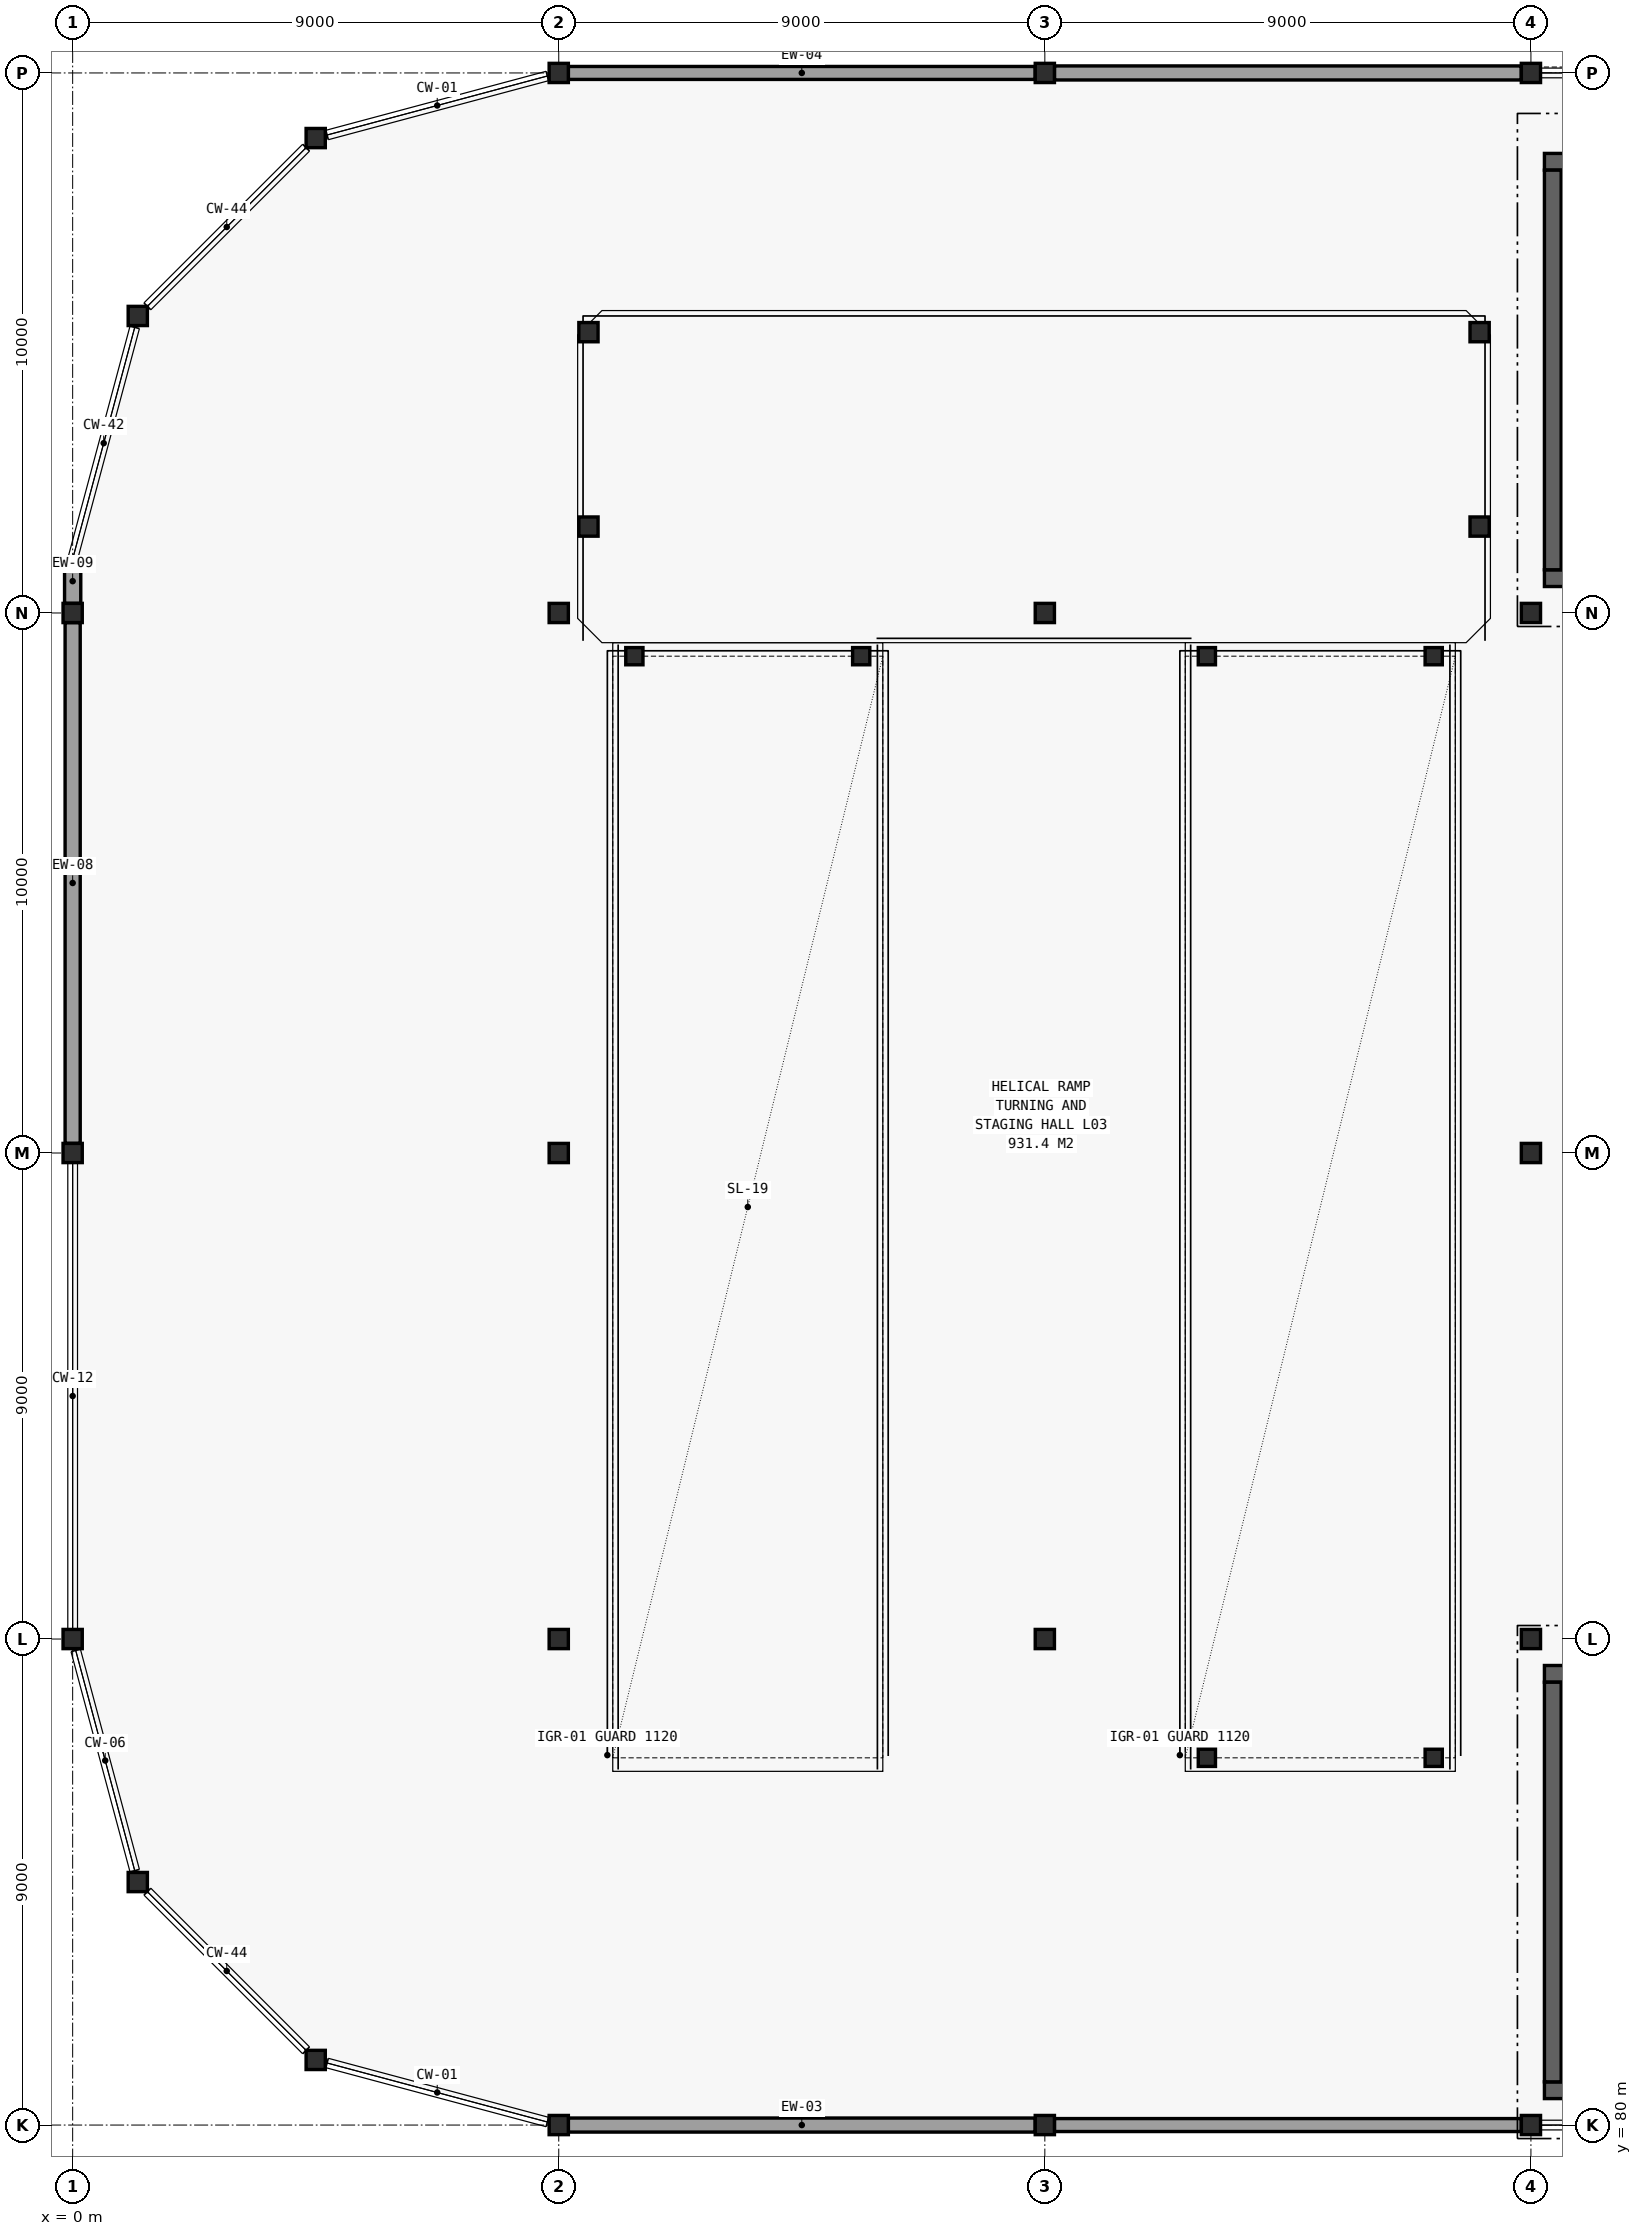
"""IFC4 building model, lengths in metres.
Left out: names, types, materials, properties, quantities, classifications, styles, units other than length and angle.
Written with IfcOpenShell. Run it as: python <this file> out.ifc"""

import sys

from ifc_helpers import new_model, si_unit, direction, frame, frame_2d, origin, origin_2d, place, context, subcontext, project, spatial, rectangle, hollow_circle, extrude, element, save


model = new_model("IFC4")
c1 = context("Model", 3, precision=1e-05, world=origin(), true_north=direction((0.0, 1.0)))
c2 = subcontext(c1, "Body", "Model", "MODEL_VIEW")
j1 = project(units=[si_unit("LENGTHUNIT", "METRE"), si_unit("PLANEANGLEUNIT", "RADIAN")], contexts=[c1])
p1 = place(None, origin())
s1 = spatial("IfcSite", under=j1, at=p1, CompositionType="ELEMENT")
p2 = place(p1, origin())
s2 = spatial("IfcBuilding", under=s1, at=p2, CompositionType="ELEMENT")
p3 = place(p2, frame((0.0, 0.0, 13.5)))
s3 = spatial("IfcBuildingStorey", under=s2, at=p3, CompositionType="ELEMENT", Elevation=13.5)
for number, where, z_axis, x_axis in (
    (1, (0.0, 89.0, 0.0), (0.0, 0.0, 1.0), (1.0, 0.0, 0.0)),
    (2, (0.0, 98.0, 0.0), (0.0, 0.0, 1.0), (1.0, 0.0, 0.0)),
    (3, (0.0, 108.0, 0.0), (0.0, 0.0, 1.0), (1.0, 0.0, 0.0)),
    (4, (1.206, 84.5, 0.0), (0.0, 0.0, 1.0), (1.0, 0.0, 0.0)),
    (5, (1.206, 113.5, 0.0), (0.0, 0.0, 1.0), (1.0, 0.0, 0.0)),
    (6, (4.5, 81.206, 0.0), (0.0, 0.0, 1.0), (1.0, 0.0, 0.0)),
    (7, (4.5, 116.794, 0.0), (0.0, 0.0, 1.0), (1.0, 0.0, 0.0)),
    (8, (9.0, 80.0, 0.0), (0.0, 0.0, 1.0), (1.0, 0.0, 0.0)),
    (9, (9.0, 89.0, 0.0), (0.0, 0.0, 1.0), (1.0, 0.0, 0.0)),
    (10, (9.0, 98.0, 0.0), (0.0, 0.0, 1.0), (1.0, 0.0, 0.0)),
    (11, (9.0, 108.0, 0.0), (0.0, 0.0, 1.0), (1.0, 0.0, 0.0)),
    (12, (9.0, 118.0, 0.0), (0.0, 0.0, 1.0), (1.0, 0.0, 0.0)),
    (13, (9.55, 109.6, 0.0), (0.0, 0.0, 1.0), (1.0, 0.0, 0.0)),
    (14, (9.55, 113.2, 0.0), (0.0, 0.0, 1.0), (1.0, 0.0, 0.0)),
):
    element("IfcColumn", number, at=place(p3, frame(where, z_axis=z_axis, x_axis=x_axis)), inside=s3, PredefinedType="COLUMN", context=c2, shape_type="SweptSolid", body=[
        extrude(hollow_circle(Radius=0.178, WallThickness=0.013, at=origin_2d()), origin(), (0.0, 0.0, 1.0), 4.2),
    ])
for number, where, z_axis, x_axis in (
    (15, (10.4, 107.2, 0.0), (0.0, 0.0, 1.0), (1.0, 0.0, 0.0)),
    (16, (14.6, 107.2, 0.0), (0.0, 0.0, 1.0), (1.0, 0.0, 0.0)),
):
    element("IfcColumn", number, at=place(p3, frame(where, z_axis=z_axis, x_axis=x_axis)), inside=s3, PredefinedType="COLUMN", context=c2, shape_type="SweptSolid", body=[
        extrude(hollow_circle(Radius=0.159, WallThickness=0.01, at=origin_2d()), origin(), (0.0, 0.0, 1.0), 1.7),
    ])
for number, where, z_axis, x_axis in (
    (17, (18.0, 80.0, 0.0), (0.0, 0.0, 1.0), (1.0, 0.0, 0.0)),
    (18, (18.0, 89.0, 0.0), (0.0, 0.0, 1.0), (1.0, 0.0, 0.0)),
    (19, (18.0, 108.0, 0.0), (0.0, 0.0, 1.0), (1.0, 0.0, 0.0)),
    (20, (18.0, 118.0, 0.0), (0.0, 0.0, 1.0), (1.0, 0.0, 0.0)),
):
    element("IfcColumn", number, at=place(p3, frame(where, z_axis=z_axis, x_axis=x_axis)), inside=s3, PredefinedType="COLUMN", context=c2, shape_type="SweptSolid", body=[
        extrude(hollow_circle(Radius=0.178, WallThickness=0.013, at=origin_2d()), origin(), (0.0, 0.0, 1.0), 4.2),
    ])
p4 = place(p3, frame((21.0, 86.8, 0.0), z_axis=(0.0, 0.0, 1.0), x_axis=(1.0, 0.0, 0.0)))
e21 = element("IfcColumn", 21, at=p4, inside=s3, PredefinedType="COLUMN", context=c2, shape_type="SweptSolid", body=[
    extrude(hollow_circle(Radius=0.159, WallThickness=0.01, at=origin_2d()), origin(), (0.0, 0.0, 1.0), 3.8),
])
p5 = place(p3, frame((21.0, 107.2, 0.0), z_axis=(0.0, 0.0, 1.0), x_axis=(1.0, 0.0, 0.0)))
e22 = element("IfcColumn", 22, at=p5, inside=s3, PredefinedType="COLUMN", context=c2, shape_type="SweptSolid", body=[
    extrude(hollow_circle(Radius=0.159, WallThickness=0.01, at=origin_2d()), origin(), (0.0, 0.0, 1.0), 1.7),
])
p6 = place(p3, frame((25.2, 86.8, 0.0), z_axis=(0.0, 0.0, 1.0), x_axis=(1.0, 0.0, 0.0)))
e23 = element("IfcColumn", 23, at=p6, inside=s3, PredefinedType="COLUMN", context=c2, shape_type="SweptSolid", body=[
    extrude(hollow_circle(Radius=0.159, WallThickness=0.01, at=origin_2d()), origin(), (0.0, 0.0, 1.0), 3.8),
])
p7 = place(p3, frame((25.2, 107.2, 0.0), z_axis=(0.0, 0.0, 1.0), x_axis=(1.0, 0.0, 0.0)))
e24 = element("IfcColumn", 24, at=p7, inside=s3, PredefinedType="COLUMN", context=c2, shape_type="SweptSolid", body=[
    extrude(hollow_circle(Radius=0.159, WallThickness=0.01, at=origin_2d()), origin(), (0.0, 0.0, 1.0), 1.7),
])
for number, where, z_axis, x_axis in (
    (25, (26.05, 109.6, 0.0), (0.0, 0.0, 1.0), (1.0, 0.0, 0.0)),
    (26, (26.05, 113.2, 0.0), (0.0, 0.0, 1.0), (1.0, 0.0, 0.0)),
    (27, (27.0, 80.0, 0.0), (0.0, 0.0, 1.0), (1.0, 0.0, 0.0)),
    (28, (27.0, 89.0, 0.0), (0.0, 0.0, 1.0), (1.0, 0.0, 0.0)),
    (29, (27.0, 98.0, 0.0), (0.0, 0.0, 1.0), (1.0, 0.0, 0.0)),
    (30, (27.0, 108.0, 0.0), (0.0, 0.0, 1.0), (1.0, 0.0, 0.0)),
    (31, (27.0, 118.0, 0.0), (0.0, 0.0, 1.0), (1.0, 0.0, 0.0)),
):
    element("IfcColumn", number, at=place(p3, frame(where, z_axis=z_axis, x_axis=x_axis)), inside=s3, PredefinedType="COLUMN", context=c2, shape_type="SweptSolid", body=[
        extrude(hollow_circle(Radius=0.178, WallThickness=0.013, at=origin_2d()), origin(), (0.0, 0.0, 1.0), 4.2),
    ])
p8 = place(p3, frame((9.178, 80.0, 0.0), z_axis=(0.0, 0.0, 1.0), x_axis=(1.0, 0.0, 0.0)))
e32 = element("IfcWall", 32, at=p8, inside=s3, PredefinedType="SOLIDWALL", context=c2, shape_type="SweptSolid", body=[
    extrude(rectangle(XDim=8.645, YDim=0.26, at=frame_2d((4.322, 0.0))), origin(), (0.0, 0.0, 1.0), 3.25),
])
p9 = place(p3, frame((18.178, 80.0, 0.0), z_axis=(0.0, 0.0, 1.0), x_axis=(1.0, 0.0, 0.0)))
e33 = element("IfcWall", 33, at=p9, inside=s3, PredefinedType="SOLIDWALL", context=c2, shape_type="SweptSolid", body=[
    extrude(rectangle(XDim=8.645, YDim=0.24, at=frame_2d((4.322, 0.0))), origin(), (0.0, 0.0, 1.0), 3.25),
])
p10 = place(p3, frame((26.822, 118.0, 0.0), z_axis=(0.0, 0.0, 1.0), x_axis=(-1.0, 0.0, 0.0)))
e34 = element("IfcWall", 34, at=p10, inside=s3, PredefinedType="SOLIDWALL", context=c2, shape_type="SweptSolid", body=[
    extrude(rectangle(XDim=8.645, YDim=0.26, at=frame_2d((4.322, 0.0))), origin(), (0.0, 0.0, 1.0), 3.25),
])
p11 = place(p3, frame((17.822, 118.0, 0.0), z_axis=(0.0, 0.0, 1.0), x_axis=(-1.0, 0.0, 0.0)))
e35 = element("IfcWall", 35, at=p11, inside=s3, PredefinedType="SOLIDWALL", context=c2, shape_type="SweptSolid", body=[
    extrude(rectangle(XDim=8.645, YDim=0.24, at=frame_2d((4.322, 0.0))), origin(), (0.0, 0.0, 1.0), 3.25),
])
p12 = place(p3, frame((0.0, 109.0, 0.0), z_axis=(0.0, 0.0, 1.0), x_axis=(0.0, -1.0, 0.0)))
e36 = element("IfcWall", 36, at=p12, inside=s3, PredefinedType="SOLIDWALL", context=c2, shape_type="SweptSolid", body=[
    extrude(rectangle(XDim=0.822, YDim=0.3, at=frame_2d((0.411, 0.0))), origin(), (0.0, 0.0, 1.0), 3.3),
])
p13 = place(p3, frame((0.0, 107.822, 0.0), z_axis=(0.0, 0.0, 1.0), x_axis=(0.0, -1.0, 0.0)))
e37 = element("IfcWall", 37, at=p13, inside=s3, PredefinedType="SOLIDWALL", context=c2, shape_type="SweptSolid", body=[
    extrude(rectangle(XDim=9.645, YDim=0.28, at=frame_2d((4.822, 0.0))), origin(), (0.0, 0.0, 1.0), 3.3),
])
for number, where, z_axis, x_axis in (
    (38, (27.25, 80.645, 0.0), (0.0, 0.0, 1.0), (1.0, 0.0, 0.0)),
    (39, (27.25, 88.355, 0.0), (0.0, 0.0, 1.0), (1.0, 0.0, 0.0)),
):
    element("IfcWall", number, at=place(p3, frame(where, z_axis=z_axis, x_axis=x_axis)), inside=s3, PredefinedType="SHEAR", context=c2, shape_type="SweptSolid", body=[
        extrude(rectangle(XDim=3.9, YDim=0.31, at=frame_2d((1.95, 0.0))), origin(), (0.0, 0.0, 1.0), 3.95),
    ])
p14 = place(p3, frame((27.405, 80.8, 0.0), z_axis=(0.0, 0.0, 1.0), x_axis=(0.0, 1.0, 0.0)))
e40 = element("IfcWall", 40, at=p14, inside=s3, PredefinedType="SHEAR", context=c2, shape_type="SweptSolid", body=[
    extrude(rectangle(XDim=7.4, YDim=0.31, at=frame_2d((3.7, 0.0))), origin(), (0.0, 0.0, 1.0), 3.95),
])
for number, where, z_axis, x_axis in (
    (41, (27.25, 108.645, 0.0), (0.0, 0.0, 1.0), (1.0, 0.0, 0.0)),
    (42, (27.25, 116.355, 0.0), (0.0, 0.0, 1.0), (1.0, 0.0, 0.0)),
):
    element("IfcWall", number, at=place(p3, frame(where, z_axis=z_axis, x_axis=x_axis)), inside=s3, PredefinedType="SHEAR", context=c2, shape_type="SweptSolid", body=[
        extrude(rectangle(XDim=3.9, YDim=0.31, at=frame_2d((1.95, 0.0))), origin(), (0.0, 0.0, 1.0), 3.95),
    ])
p15 = place(p3, frame((27.405, 108.8, 0.0), z_axis=(0.0, 0.0, 1.0), x_axis=(0.0, 1.0, 0.0)))
e43 = element("IfcWall", 43, at=p15, inside=s3, PredefinedType="SHEAR", context=c2, shape_type="SweptSolid", body=[
    extrude(rectangle(XDim=7.4, YDim=0.31, at=frame_2d((3.7, 0.0))), origin(), (0.0, 0.0, 1.0), 3.95),
])
save(model, sys.argv[1])
